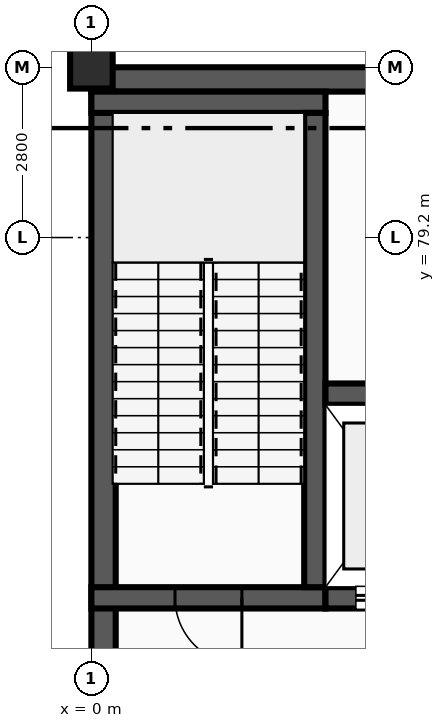
"""IFC4 building model, lengths in metres.
Left out: names, types, materials, properties, quantities, classifications, styles, units other than length and angle.
Written with IfcOpenShell. Run it as: python <this file> out.ifc"""

import sys

from ifc_helpers import new_model, si_unit, direction, frame, frame_2d, origin, origin_2d, place, context, subcontext, project, spatial, rectangle, extrude, element, fill, save


model = new_model("IFC4")
c1 = context("Model", 3, precision=1e-05, world=origin(), true_north=direction((0.0, 1.0)))
c2 = subcontext(c1, "Body", "Model", "MODEL_VIEW")
j1 = project(units=[si_unit("LENGTHUNIT", "METRE"), si_unit("PLANEANGLEUNIT", "RADIAN")], contexts=[c1])
p1 = place(None, origin())
s1 = spatial("IfcSite", under=j1, at=p1, CompositionType="ELEMENT")
p2 = place(p1, origin())
s2 = spatial("IfcBuilding", under=s1, at=p2, CompositionType="ELEMENT")
p3 = place(p2, frame((0.0, 0.0, -4.8)))
s3 = spatial("IfcBuildingStorey", under=s2, at=p3, CompositionType="ELEMENT", Elevation=-4.8)
p4 = place(p3, frame((0.0, 82.0, 0.0), z_axis=(0.0, 0.0, 1.0), x_axis=(1.0, 0.0, 0.0)))
e1 = element("IfcColumn", 1, at=p4, inside=s3, PredefinedType="COLUMN", context=c2, shape_type="SweptSolid", body=[
    extrude(rectangle(XDim=0.7, YDim=0.7, at=origin_2d()), origin(), (0.0, 0.0, 1.0), 4.8),
])
p5 = place(p3, frame((28.8, 81.8, 0.0), z_axis=(0.0, 0.0, 1.0), x_axis=(-1.0, 0.0, 0.0)))
e2 = element("IfcWall", 2, at=p5, inside=s3, PredefinedType="USERDEFINED", context=c2, shape_type="SweptSolid", body=[
    extrude(rectangle(XDim=28.8, YDim=0.4, at=frame_2d((14.4, 0.0))), origin(), (0.0, 0.0, 1.0), 4.545),
])
p6 = place(p3, frame((0.2, 81.6, 0.0), z_axis=(0.0, 0.0, 1.0), x_axis=(0.0, -1.0, 0.0)))
e3 = element("IfcWall", 3, at=p6, inside=s3, PredefinedType="USERDEFINED", context=c2, shape_type="SweptSolid", body=[
    extrude(rectangle(XDim=81.2, YDim=0.4, at=frame_2d((40.6, 0.0))), origin(), (0.0, 0.0, 1.0), 4.545),
])
p7 = place(p3, frame((0.0, 73.275, 0.0), z_axis=(0.0, 0.0, 1.0), x_axis=(1.0, 0.0, 0.0)))
e4 = element("IfcWall", 4, at=p7, inside=s3, PredefinedType="SHEAR", context=c2, shape_type="SweptSolid", body=[
    extrude(rectangle(XDim=3.85, YDim=0.35, at=frame_2d((1.925, 0.0))), origin(), (0.0, 0.0, 1.0), 4.545),
])
p8 = place(p7, frame((1.375, 0.0, 0.0)))
e5 = element("IfcOpeningElement", 5, at=p8, cuts=e4, PredefinedType="OPENING", context=c2, shape_type="SweptSolid", body=[
    extrude(rectangle(XDim=1.1, YDim=2.15, at=frame_2d((0.55, 1.075))), frame((0.0, 0.185, 0.0), z_axis=(0.0, -1.0, 0.0), x_axis=(1.0, 0.0, 0.0)), (0.0, 0.0, 1.0), 0.37),
])
p9 = place(p3, frame((0.0, 81.425, 0.0), z_axis=(0.0, 0.0, 1.0), x_axis=(1.0, 0.0, 0.0)))
e6 = element("IfcWall", 6, at=p9, inside=s3, PredefinedType="SHEAR", context=c2, shape_type="SweptSolid", body=[
    extrude(rectangle(XDim=3.85, YDim=0.35, at=frame_2d((1.925, 0.0))), origin(), (0.0, 0.0, 1.0), 4.545),
])
p10 = place(p3, frame((3.675, 73.45, 0.0), z_axis=(0.0, 0.0, 1.0), x_axis=(0.0, 1.0, 0.0)))
e7 = element("IfcWall", 7, at=p10, inside=s3, PredefinedType="SHEAR", context=c2, shape_type="SweptSolid", body=[
    extrude(rectangle(XDim=7.8, YDim=0.35, at=frame_2d((3.9, 0.0))), origin(), (0.0, 0.0, 1.0), 4.545),
])
p11 = place(p3, frame((3.85, 73.275, 0.0), z_axis=(0.0, 0.0, 1.0), x_axis=(1.0, 0.0, 0.0)))
e8 = element("IfcWall", 8, at=p11, inside=s3, PredefinedType="SHEAR", context=c2, shape_type="SweptSolid", body=[
    extrude(rectangle(XDim=2.2, YDim=0.35, at=frame_2d((1.1, 0.0))), origin(), (0.0, 0.0, 1.0), 4.545),
])
p12 = place(p11, frame((0.5, 0.0, 0.0)))
e9 = element("IfcOpeningElement", 9, at=p12, cuts=e8, PredefinedType="OPENING", context=c2, shape_type="SweptSolid", body=[
    extrude(rectangle(XDim=1.2, YDim=2.2, at=frame_2d((0.6, 1.1))), frame((0.0, 0.185, 0.0), z_axis=(0.0, -1.0, 0.0), x_axis=(1.0, 0.0, 0.0)), (0.0, 0.0, 1.0), 0.37),
])
p13 = place(p3, frame((3.85, 76.625, 0.0), z_axis=(0.0, 0.0, 1.0), x_axis=(1.0, 0.0, 0.0)))
e10 = element("IfcWall", 10, at=p13, inside=s3, PredefinedType="SHEAR", context=c2, shape_type="SweptSolid", body=[
    extrude(rectangle(XDim=2.2, YDim=0.35, at=frame_2d((1.1, 0.0))), origin(), (0.0, 0.0, 1.0), 4.545),
])
p14 = place(p8, origin())
e11 = element("IfcDoor", 11, at=p14, inside=s3, OperationType="SINGLE_SWING_RIGHT", PredefinedType="DOOR", context=c2, shape_type="SweptSolid", body=[
    extrude(rectangle(XDim=1.1, YDim=2.15, at=frame_2d((0.55, 1.075))), frame((0.0, 0.025, 0.0), z_axis=(0.0, -1.0, 0.0), x_axis=(1.0, 0.0, 0.0)), (0.0, 0.0, 1.0), 0.05),
])
fill(e5, e11)
p15 = place(p12, origin())
e12 = element("IfcDoor", 12, at=p15, inside=s3, OperationType="SLIDING_TO_RIGHT", PredefinedType="DOOR", context=c2, shape_type="SweptSolid", body=[
    extrude(rectangle(XDim=1.2, YDim=2.2, at=frame_2d((0.6, 1.1))), frame((0.0, 0.025, 0.0), z_axis=(0.0, -1.0, 0.0), x_axis=(1.0, 0.0, 0.0)), (0.0, 0.0, 1.0), 0.05),
])
fill(e9, e12)
save(model, sys.argv[1])
